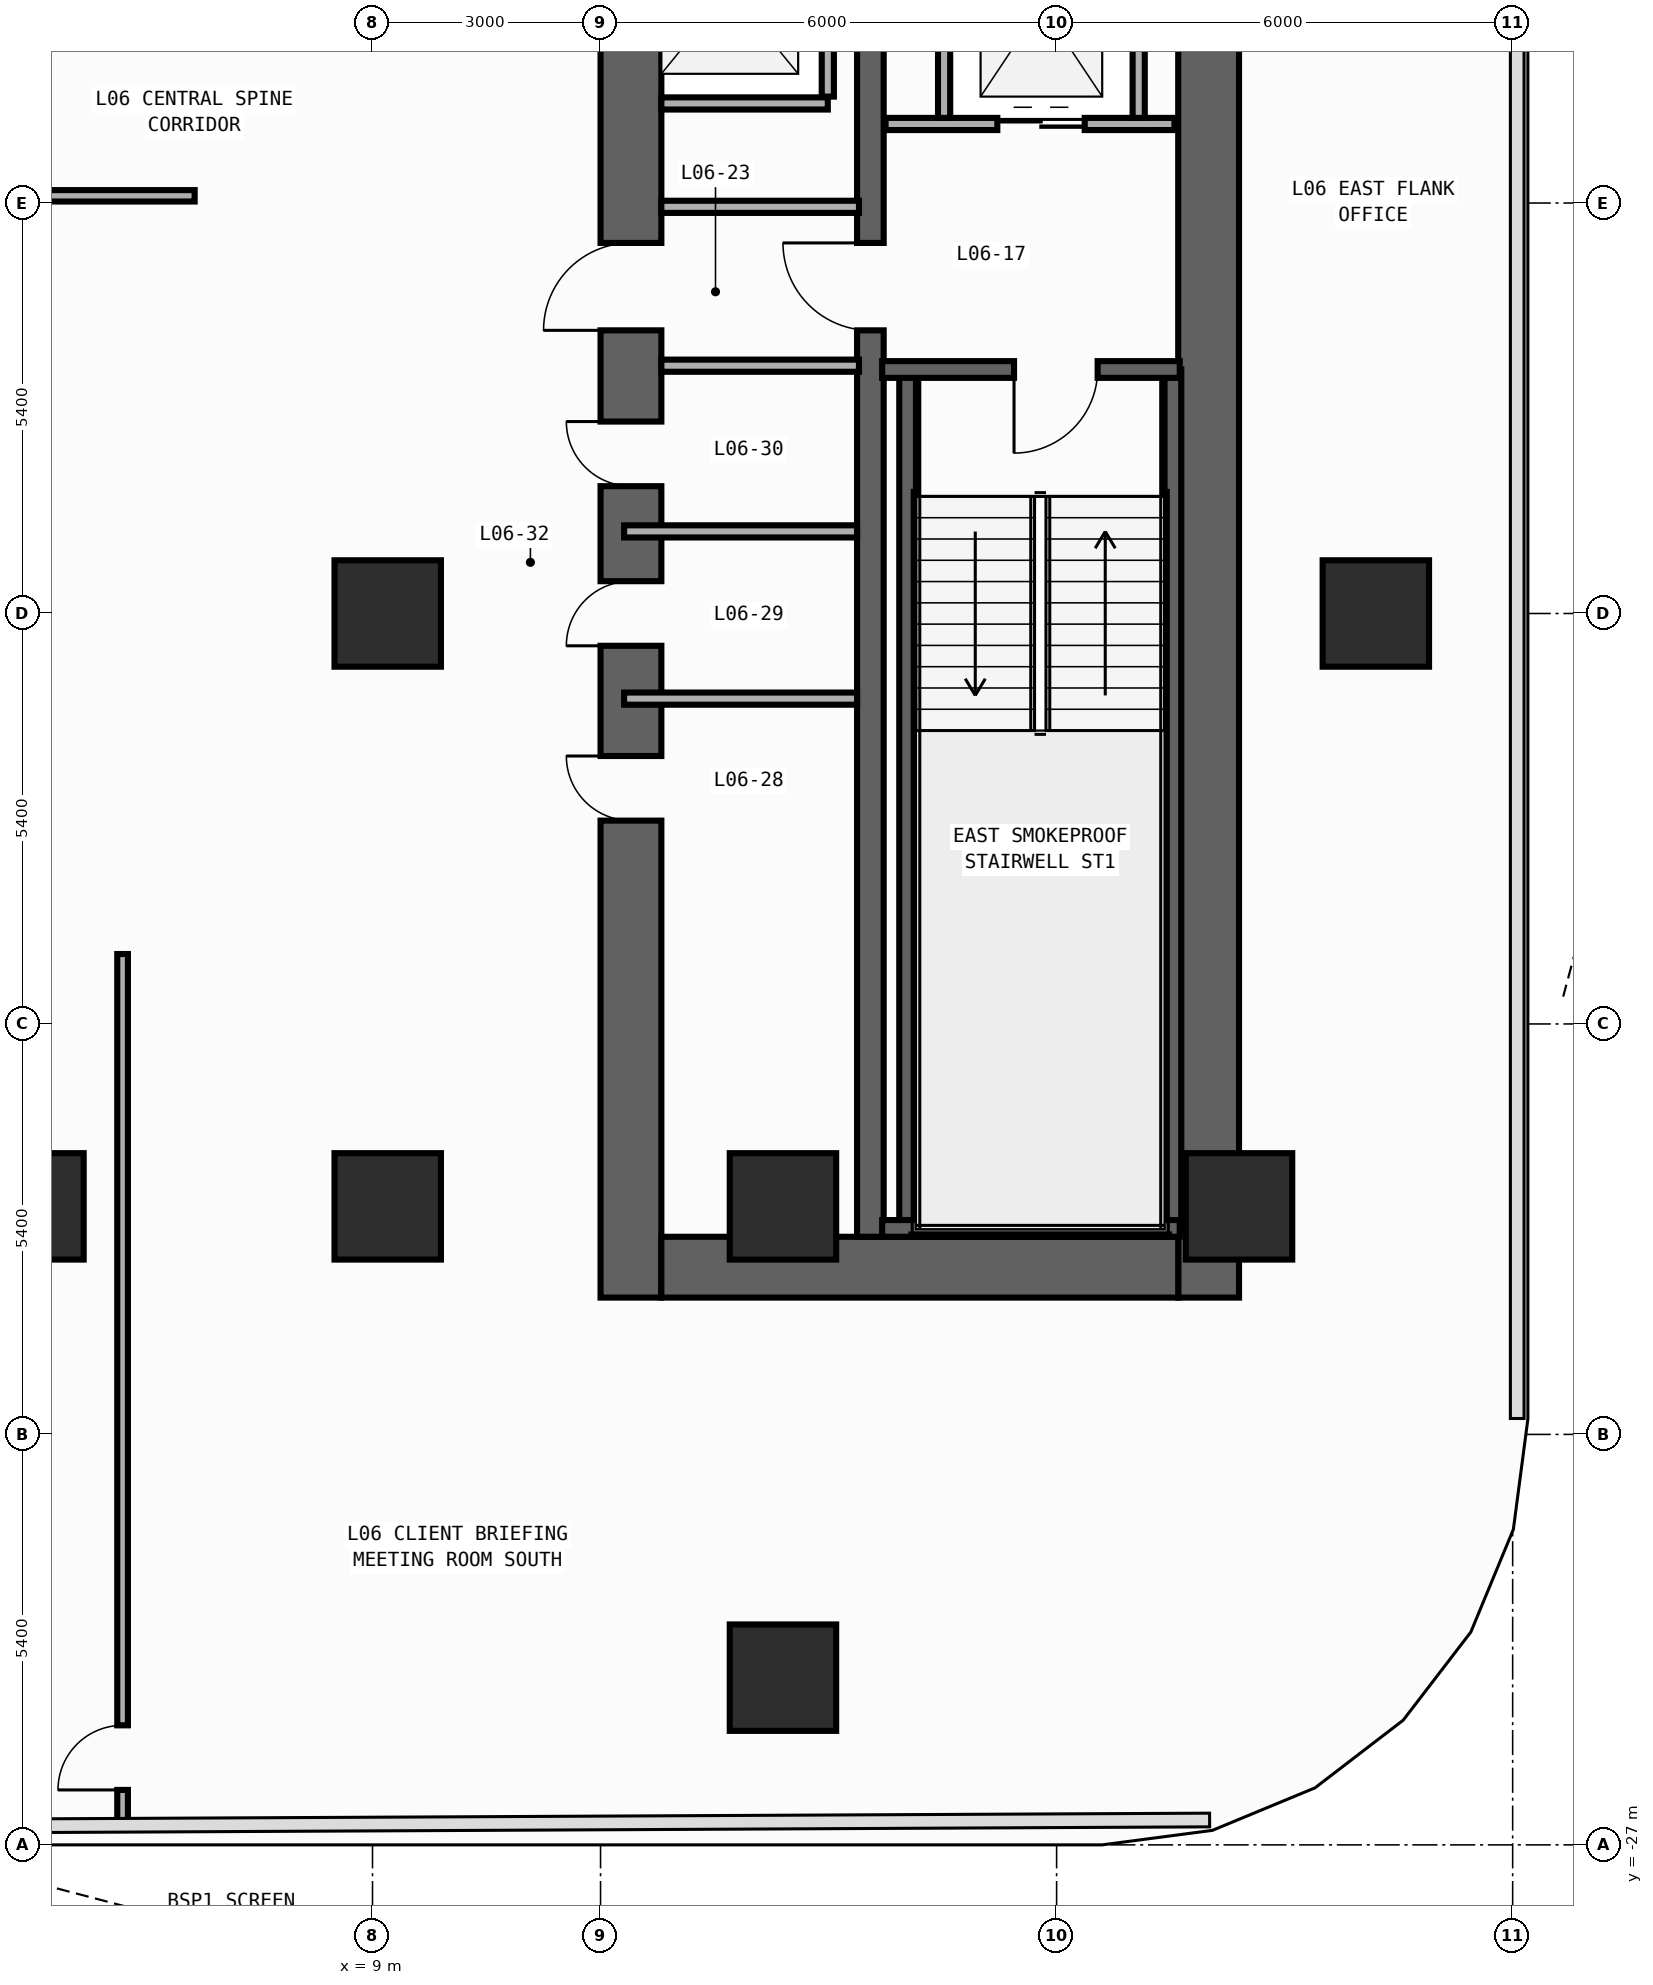
"""IFC4 building model, lengths in metres.
Left out: names, types, materials, properties, quantities, classifications, styles, units other than length and angle.
Written with IfcOpenShell. Run it as: python <this file> out.ifc"""

import sys

from ifc_helpers import new_model, si_unit, direction, frame, frame_2d, origin, origin_2d, place, context, subcontext, project, spatial, rectangle, extrude, element, fill, save


model = new_model("IFC4")
c1 = context("Model", 3, precision=1e-05, world=origin(), true_north=direction((0.0, 1.0)))
c2 = subcontext(c1, "Body", "Model", "MODEL_VIEW")
j1 = project(units=[si_unit("LENGTHUNIT", "METRE"), si_unit("PLANEANGLEUNIT", "RADIAN")], contexts=[c1])
p1 = place(None, origin())
s1 = spatial("IfcSite", under=j1, at=p1, CompositionType="ELEMENT")
p2 = place(p1, origin())
s2 = spatial("IfcBuilding", under=s1, at=p2, CompositionType="ELEMENT")
p3 = place(p2, frame((0.0, 0.0, 26.0)))
s3 = spatial("IfcBuildingStorey", under=s2, at=p3, CompositionType="ELEMENT", Elevation=26.0)
p4 = place(p3, frame((12.4, -19.8, 0.0), z_axis=(0.0, 0.0, 1.0), x_axis=(0.0, 1.0, 0.0)))
e1 = element("IfcWall", 1, at=p4, inside=s3, PredefinedType="SHEAR", context=c2, shape_type="SweptSolid", body=[
    extrude(rectangle(XDim=27.0, YDim=0.8, at=frame_2d((13.5, 0.0))), origin(), (0.0, 0.0, 1.0), 3.94),
])
p5 = place(p4, frame((23.05, 0.0, 0.0)))
e2 = element("IfcOpeningElement", 2, at=p5, cuts=e1, PredefinedType="OPENING", context=c2, shape_type="SweptSolid", body=[
    extrude(rectangle(XDim=1.1, YDim=2.2, at=frame_2d((0.55, 1.1))), frame((0.0, 0.41, 0.0), z_axis=(0.0, -1.0, 0.0), x_axis=(1.0, 0.0, 0.0)), (0.0, 0.0, 1.0), 0.82),
])
p6 = place(p4, frame((19.85, 0.0, 0.0)))
e3 = element("IfcOpeningElement", 3, at=p6, cuts=e1, PredefinedType="OPENING", context=c2, shape_type="SweptSolid", body=[
    extrude(rectangle(XDim=1.1, YDim=2.2, at=frame_2d((0.55, 1.1))), frame((0.0, 0.41, 0.0), z_axis=(0.0, -1.0, 0.0), x_axis=(1.0, 0.0, 0.0)), (0.0, 0.0, 1.0), 0.82),
])
p7 = place(p4, frame((16.65, 0.0, 0.0)))
e4 = element("IfcOpeningElement", 4, at=p7, cuts=e1, PredefinedType="OPENING", context=c2, shape_type="SweptSolid", body=[
    extrude(rectangle(XDim=1.1, YDim=2.2, at=frame_2d((0.55, 1.1))), frame((0.0, 0.41, 0.0), z_axis=(0.0, -1.0, 0.0), x_axis=(1.0, 0.0, 0.0)), (0.0, 0.0, 1.0), 0.82),
])
p8 = place(p4, frame((6.275, 0.0, 0.0)))
e5 = element("IfcOpeningElement", 5, at=p8, cuts=e1, PredefinedType="OPENING", context=c2, shape_type="SweptSolid", body=[
    extrude(rectangle(XDim=0.85, YDim=2.1, at=frame_2d((0.425, 1.05))), frame((0.0, 0.41, 0.0), z_axis=(0.0, -1.0, 0.0), x_axis=(1.0, 0.0, 0.0)), (0.0, 0.0, 1.0), 0.82),
])
p9 = place(p4, frame((8.575, 0.0, 0.0)))
e6 = element("IfcOpeningElement", 6, at=p9, cuts=e1, PredefinedType="OPENING", context=c2, shape_type="SweptSolid", body=[
    extrude(rectangle(XDim=0.85, YDim=2.1, at=frame_2d((0.425, 1.05))), frame((0.0, 0.41, 0.0), z_axis=(0.0, -1.0, 0.0), x_axis=(1.0, 0.0, 0.0)), (0.0, 0.0, 1.0), 0.82),
])
p10 = place(p4, frame((10.675, 0.0, 0.0)))
e7 = element("IfcOpeningElement", 7, at=p10, cuts=e1, PredefinedType="OPENING", context=c2, shape_type="SweptSolid", body=[
    extrude(rectangle(XDim=0.85, YDim=2.1, at=frame_2d((0.425, 1.05))), frame((0.0, 0.41, 0.0), z_axis=(0.0, -1.0, 0.0), x_axis=(1.0, 0.0, 0.0)), (0.0, 0.0, 1.0), 0.82),
])
p11 = place(p4, frame((12.725, 0.0, 0.0)))
e8 = element("IfcOpeningElement", 8, at=p11, cuts=e1, PredefinedType="OPENING", context=c2, shape_type="SweptSolid", body=[
    extrude(rectangle(XDim=1.15, YDim=2.2, at=frame_2d((0.575, 1.1))), frame((0.0, 0.41, 0.0), z_axis=(0.0, -1.0, 0.0), x_axis=(1.0, 0.0, 0.0)), (0.0, 0.0, 1.0), 0.82),
])
p12 = place(p4, frame((25.125, 0.0, 0.0)))
e9 = element("IfcOpeningElement", 9, at=p12, cuts=e1, PredefinedType="OPENING", context=c2, shape_type="SweptSolid", body=[
    extrude(rectangle(XDim=0.85, YDim=2.1, at=frame_2d((0.425, 1.05))), frame((0.0, 0.41, 0.0), z_axis=(0.0, -1.0, 0.0), x_axis=(1.0, 0.0, 0.0)), (0.0, 0.0, 1.0), 0.82),
])
p13 = place(p3, frame((20.0, -19.8, 0.0), z_axis=(0.0, 0.0, 1.0), x_axis=(0.0, 1.0, 0.0)))
e10 = element("IfcWall", 10, at=p13, inside=s3, PredefinedType="SHEAR", context=c2, shape_type="SweptSolid", body=[
    extrude(rectangle(XDim=27.0, YDim=0.8, at=frame_2d((13.5, 0.0))), origin(), (0.0, 0.0, 1.0), 3.94),
])
p14 = place(p3, frame((12.8, -19.4, 0.0), z_axis=(0.0, 0.0, 1.0), x_axis=(1.0, 0.0, 0.0)))
e11 = element("IfcWall", 11, at=p14, inside=s3, PredefinedType="SHEAR", context=c2, shape_type="SweptSolid", body=[
    extrude(rectangle(XDim=6.8, YDim=0.8, at=frame_2d((3.4, 0.0))), origin(), (0.0, 0.0, 1.0), 3.94),
])
p15 = place(p3, frame((15.55, -19.0, 0.0), z_axis=(0.0, 0.0, 1.0), x_axis=(0.0, 1.0, 0.0)))
e12 = element("IfcWall", 12, at=p15, inside=s3, PredefinedType="SHEAR", context=c2, shape_type="SweptSolid", body=[
    extrude(rectangle(XDim=25.4, YDim=0.35, at=frame_2d((12.7, 0.0))), origin(), (0.0, 0.0, 1.0), 3.94),
])
p16 = place(p15, frame((11.925, 0.0, 0.0)))
e13 = element("IfcOpeningElement", 13, at=p16, cuts=e12, PredefinedType="OPENING", context=c2, shape_type="SweptSolid", body=[
    extrude(rectangle(XDim=1.15, YDim=2.2, at=frame_2d((0.575, 1.1))), frame((0.0, 0.185, 0.0), z_axis=(0.0, -1.0, 0.0), x_axis=(1.0, 0.0, 0.0)), (0.0, 0.0, 1.0), 0.37),
])
p17 = place(p15, frame((24.325, 0.0, 0.0)))
e14 = element("IfcOpeningElement", 14, at=p17, cuts=e12, PredefinedType="OPENING", context=c2, shape_type="SweptSolid", body=[
    extrude(rectangle(XDim=0.85, YDim=2.1, at=frame_2d((0.425, 1.05))), frame((0.0, 0.185, 0.0), z_axis=(0.0, -1.0, 0.0), x_axis=(1.0, 0.0, 0.0)), (0.0, 0.0, 1.0), 0.37),
])
for number, where, z_axis, x_axis in (
    (15, (16.04, -18.89, 0.0), (0.0, 0.0, 1.0), (0.0, 1.0, 0.0)),
    (16, (19.53, -18.89, 0.0), (0.0, 0.0, 1.0), (0.0, 1.0, 0.0)),
):
    element("IfcWall", number, at=place(p3, frame(where, z_axis=z_axis, x_axis=x_axis)), inside=s3, PredefinedType="SHEAR", context=c2, shape_type="SweptSolid", body=[
        extrude(rectangle(XDim=11.3, YDim=0.22, at=frame_2d((5.65, 0.0))), origin(), (0.0, 0.0, 1.0), 3.94),
    ])
p18 = place(p3, frame((15.705, -18.89, 0.0), z_axis=(0.0, 0.0, 1.0), x_axis=(1.0, 0.0, 0.0)))
e17 = element("IfcWall", 17, at=p18, inside=s3, PredefinedType="SHEAR", context=c2, shape_type="SweptSolid", body=[
    extrude(rectangle(XDim=3.915, YDim=0.22, at=frame_2d((1.958, 0.0))), origin(), (0.0, 0.0, 1.0), 3.94),
])
p19 = place(p3, frame((19.62, -7.59, 0.0), z_axis=(0.0, 0.0, 1.0), x_axis=(-1.0, 0.0, 0.0)))
e18 = element("IfcWall", 18, at=p19, inside=s3, PredefinedType="SHEAR", context=c2, shape_type="SweptSolid", body=[
    extrude(rectangle(XDim=3.915, YDim=0.22, at=frame_2d((1.958, 0.0))), origin(), (0.0, 0.0, 1.0), 3.94),
])
p20 = place(p19, frame((1.08, 0.0, 0.0)))
e19 = element("IfcOpeningElement", 19, at=p20, cuts=e18, PredefinedType="OPENING", context=c2, shape_type="SweptSolid", body=[
    extrude(rectangle(XDim=1.1, YDim=2.2, at=frame_2d((0.55, 1.1))), frame((0.0, 0.12, 0.0), z_axis=(0.0, -1.0, 0.0), x_axis=(1.0, 0.0, 0.0)), (0.0, 0.0, 1.0), 0.24),
])
for number, where, z_axis, x_axis in (
    (20, (9.2, -18.6, 0.0), (0.0, 0.0, 1.0), (1.0, 0.0, 0.0)),
    (21, (9.2, -10.8, 0.0), (0.0, 0.0, 1.0), (1.0, 0.0, 0.0)),
    (22, (20.4, -18.6, 0.0), (0.0, 0.0, 1.0), (1.0, 0.0, 0.0)),
    (23, (14.4, -18.6, 0.0), (0.0, 0.0, 1.0), (1.0, 0.0, 0.0)),
    (24, (4.5, -18.6, 0.0), (0.0, 0.0, 1.0), (1.0, 0.0, 0.0)),
    (25, (22.2, -10.8, 0.0), (0.0, 0.0, 1.0), (1.0, 0.0, 0.0)),
    (26, (14.4, -24.8, 0.0), (0.0, 0.0, 1.0), (1.0, 0.0, 0.0)),
):
    element("IfcColumn", number, at=place(p3, frame(where, z_axis=z_axis, x_axis=x_axis)), inside=s3, PredefinedType="COLUMN", context=c2, shape_type="SweptSolid", body=[
        extrude(rectangle(XDim=1.4, YDim=1.4, at=origin_2d()), origin(), (0.0, 0.0, 1.0), 4.2),
    ])
p21 = place(p3, frame((12.8, -4.09, 0.0), z_axis=(0.0, 0.0, 1.0), x_axis=(1.0, 0.0, 0.0)))
e27 = element("IfcWall", 27, at=p21, inside=s3, PredefinedType="STANDARD", context=c2, shape_type="SweptSolid", body=[
    extrude(rectangle(XDim=2.19, YDim=0.16, at=frame_2d((1.095, 0.0))), origin(), (0.0, 0.0, 1.0), 3.94),
])
p22 = place(p3, frame((14.99, -4.0, 0.0), z_axis=(0.0, 0.0, 1.0), x_axis=(0.0, 1.0, 0.0)))
e28 = element("IfcWall", 28, at=p22, inside=s3, PredefinedType="STANDARD", context=c2, shape_type="SweptSolid", body=[
    extrude(rectangle(XDim=2.8, YDim=0.16, at=frame_2d((1.4, 0.0))), origin(), (0.0, 0.0, 1.0), 3.94),
])
p23 = place(p3, frame((15.75, -4.36, 0.0), z_axis=(0.0, 0.0, 1.0), x_axis=(1.0, 0.0, 0.0)))
e29 = element("IfcWall", 29, at=p23, inside=s3, PredefinedType="STANDARD", context=c2, shape_type="SweptSolid", body=[
    extrude(rectangle(XDim=3.8, YDim=0.16, at=frame_2d((1.9, 0.0))), origin(), (0.0, 0.0, 1.0), 3.94),
])
p24 = place(p23, frame((1.47, 0.0, 0.0)))
e30 = element("IfcOpeningElement", 30, at=p24, cuts=e29, PredefinedType="OPENING", context=c2, shape_type="SweptSolid", body=[
    extrude(rectangle(XDim=1.15, YDim=2.2, at=frame_2d((0.575, 1.1))), frame((0.0, 0.09, 0.0), z_axis=(0.0, -1.0, 0.0), x_axis=(1.0, 0.0, 0.0)), (0.0, 0.0, 1.0), 0.18),
])
for number, where, z_axis, x_axis in (
    (31, (16.52, -4.28, 0.0), (0.0, 0.0, 1.0), (0.0, 1.0, 0.0)),
    (32, (19.08, -4.28, 0.0), (0.0, 0.0, 1.0), (0.0, 1.0, 0.0)),
):
    element("IfcWall", number, at=place(p3, frame(where, z_axis=z_axis, x_axis=x_axis)), inside=s3, PredefinedType="STANDARD", context=c2, shape_type="SweptSolid", body=[
        extrude(rectangle(XDim=2.98, YDim=0.16, at=frame_2d((1.49, 0.0))), origin(), (0.0, 0.0, 1.0), 3.94),
    ])
for number, where, z_axis, x_axis in (
    (33, (12.8, -5.45, 0.0), (0.0, 0.0, 1.0), (1.0, 0.0, 0.0)),
    (34, (12.8, -7.54, 0.0), (0.0, 0.0, 1.0), (1.0, 0.0, 0.0)),
):
    element("IfcWall", number, at=place(p3, frame(where, z_axis=z_axis, x_axis=x_axis)), inside=s3, PredefinedType="STANDARD", context=c2, shape_type="SweptSolid", body=[
        extrude(rectangle(XDim=2.6, YDim=0.16, at=frame_2d((1.3, 0.0))), origin(), (0.0, 0.0, 1.0), 3.94),
    ])
for number, where, z_axis, x_axis in (
    (35, (12.31, -11.92, 0.0), (0.0, 0.0, 1.0), (1.0, 0.0, 0.0)),
    (36, (12.31, -9.72, 0.0), (0.0, 0.0, 1.0), (1.0, 0.0, 0.0)),
):
    element("IfcWall", number, at=place(p3, frame(where, z_axis=z_axis, x_axis=x_axis)), inside=s3, PredefinedType="PARTITIONING", context=c2, shape_type="SweptSolid", body=[
        extrude(rectangle(XDim=3.065, YDim=0.16, at=frame_2d((1.532, 0.0))), origin(), (0.0, 0.0, 1.0), 3.94),
    ])
p25 = place(p3, frame((-6.66, -5.305, 0.0), z_axis=(0.0, 0.0, 1.0), x_axis=(1.0, 0.0, 0.0)))
e37 = element("IfcWall", 37, at=p25, inside=s3, PredefinedType="PARTITIONING", context=c2, shape_type="SweptSolid", body=[
    extrude(rectangle(XDim=13.32, YDim=0.15, at=frame_2d((6.66, 0.0))), origin(), (0.0, 0.0, 1.0), 3.94),
])
p26 = place(p25, frame((6.311, 0.0, 0.0)))
e38 = element("IfcOpeningElement", 38, at=p26, cuts=e37, PredefinedType="OPENING", context=c2, shape_type="SweptSolid", body=[
    extrude(rectangle(XDim=0.9, YDim=2.15, at=frame_2d((0.45, 1.075))), frame((0.0, 0.085, 0.0), z_axis=(0.0, -1.0, 0.0), x_axis=(1.0, 0.0, 0.0)), (0.0, 0.0, 1.0), 0.17),
])
p27 = place(p3, frame((5.712, -26.737, 0.0), z_axis=(0.0, 0.0, 1.0), x_axis=(0.0, 1.0, 0.0)))
e39 = element("IfcWall", 39, at=p27, inside=s3, PredefinedType="PARTITIONING", context=c2, shape_type="SweptSolid", body=[
    extrude(rectangle(XDim=11.457, YDim=0.14, at=frame_2d((5.729, 0.0))), origin(), (0.0, 0.0, 1.0), 3.94),
])
p28 = place(p27, frame((0.46, 0.0, 0.0)))
e40 = element("IfcOpeningElement", 40, at=p28, cuts=e39, PredefinedType="OPENING", context=c2, shape_type="SweptSolid", body=[
    extrude(rectangle(XDim=0.85, YDim=2.1, at=frame_2d((0.425, 1.05))), frame((0.0, 0.08, 0.0), z_axis=(0.0, -1.0, 0.0), x_axis=(1.0, 0.0, 0.0)), (0.0, 0.0, 1.0), 0.16),
])
p29 = place(p20, origin())
e41 = element("IfcDoor", 41, at=p29, inside=s3, OperationType="SINGLE_SWING_RIGHT", PredefinedType="DOOR", context=c2, shape_type="SweptSolid", body=[
    extrude(rectangle(XDim=1.1, YDim=2.2, at=frame_2d((0.55, 1.1))), frame((0.0, 0.025, 0.0), z_axis=(0.0, -1.0, 0.0), x_axis=(1.0, 0.0, 0.0)), (0.0, 0.0, 1.0), 0.05),
])
fill(e19, e41)
p30 = place(p8, origin())
e42 = element("IfcDoor", 42, at=p30, inside=s3, OperationType="SINGLE_SWING_RIGHT", PredefinedType="DOOR", context=c2, shape_type="SweptSolid", body=[
    extrude(rectangle(XDim=0.85, YDim=2.1, at=frame_2d((0.425, 1.05))), frame((0.0, 0.025, 0.0), z_axis=(0.0, -1.0, 0.0), x_axis=(1.0, 0.0, 0.0)), (0.0, 0.0, 1.0), 0.05),
])
fill(e5, e42)
p31 = place(p9, origin())
e43 = element("IfcDoor", 43, at=p31, inside=s3, OperationType="SINGLE_SWING_LEFT", PredefinedType="DOOR", context=c2, shape_type="SweptSolid", body=[
    extrude(rectangle(XDim=0.85, YDim=2.1, at=frame_2d((0.425, 1.05))), frame((0.0, 0.025, 0.0), z_axis=(0.0, -1.0, 0.0), x_axis=(1.0, 0.0, 0.0)), (0.0, 0.0, 1.0), 0.05),
])
fill(e6, e43)
p32 = place(p10, origin())
e44 = element("IfcDoor", 44, at=p32, inside=s3, OperationType="SINGLE_SWING_RIGHT", PredefinedType="DOOR", context=c2, shape_type="SweptSolid", body=[
    extrude(rectangle(XDim=0.85, YDim=2.1, at=frame_2d((0.425, 1.05))), frame((0.0, 0.025, 0.0), z_axis=(0.0, -1.0, 0.0), x_axis=(1.0, 0.0, 0.0)), (0.0, 0.0, 1.0), 0.05),
])
fill(e7, e44)
p33 = place(p11, origin())
e45 = element("IfcDoor", 45, at=p33, inside=s3, OperationType="SINGLE_SWING_LEFT", PredefinedType="DOOR", context=c2, shape_type="SweptSolid", body=[
    extrude(rectangle(XDim=1.15, YDim=2.2, at=frame_2d((0.575, 1.1))), frame((0.0, 0.025, 0.0), z_axis=(0.0, -1.0, 0.0), x_axis=(1.0, 0.0, 0.0)), (0.0, 0.0, 1.0), 0.05),
])
fill(e8, e45)
p34 = place(p16, origin())
e46 = element("IfcDoor", 46, at=p34, inside=s3, OperationType="SINGLE_SWING_RIGHT", PredefinedType="DOOR", context=c2, shape_type="SweptSolid", body=[
    extrude(rectangle(XDim=1.15, YDim=2.2, at=frame_2d((0.575, 1.1))), frame((0.0, 0.025, 0.0), z_axis=(0.0, -1.0, 0.0), x_axis=(1.0, 0.0, 0.0)), (0.0, 0.0, 1.0), 0.05),
])
fill(e13, e46)
p35 = place(p24, origin())
e47 = element("IfcDoor", 47, at=p35, inside=s3, OperationType="DOUBLE_DOOR_SLIDING", PredefinedType="DOOR", context=c2, shape_type="SweptSolid", body=[
    extrude(rectangle(XDim=1.15, YDim=2.2, at=frame_2d((0.575, 1.1))), frame((0.0, 0.025, 0.0), z_axis=(0.0, -1.0, 0.0), x_axis=(1.0, 0.0, 0.0)), (0.0, 0.0, 1.0), 0.05),
])
fill(e30, e47)
p36 = place(p28, origin())
e48 = element("IfcDoor", 48, at=p36, inside=s3, OperationType="SINGLE_SWING_LEFT", PredefinedType="DOOR", context=c2, shape_type="SweptSolid", body=[
    extrude(rectangle(XDim=0.85, YDim=2.1, at=frame_2d((0.425, 1.05))), frame((0.0, 0.025, 0.0), z_axis=(0.0, -1.0, 0.0), x_axis=(1.0, 0.0, 0.0)), (0.0, 0.0, 1.0), 0.05),
])
fill(e40, e48)
save(model, sys.argv[1])
